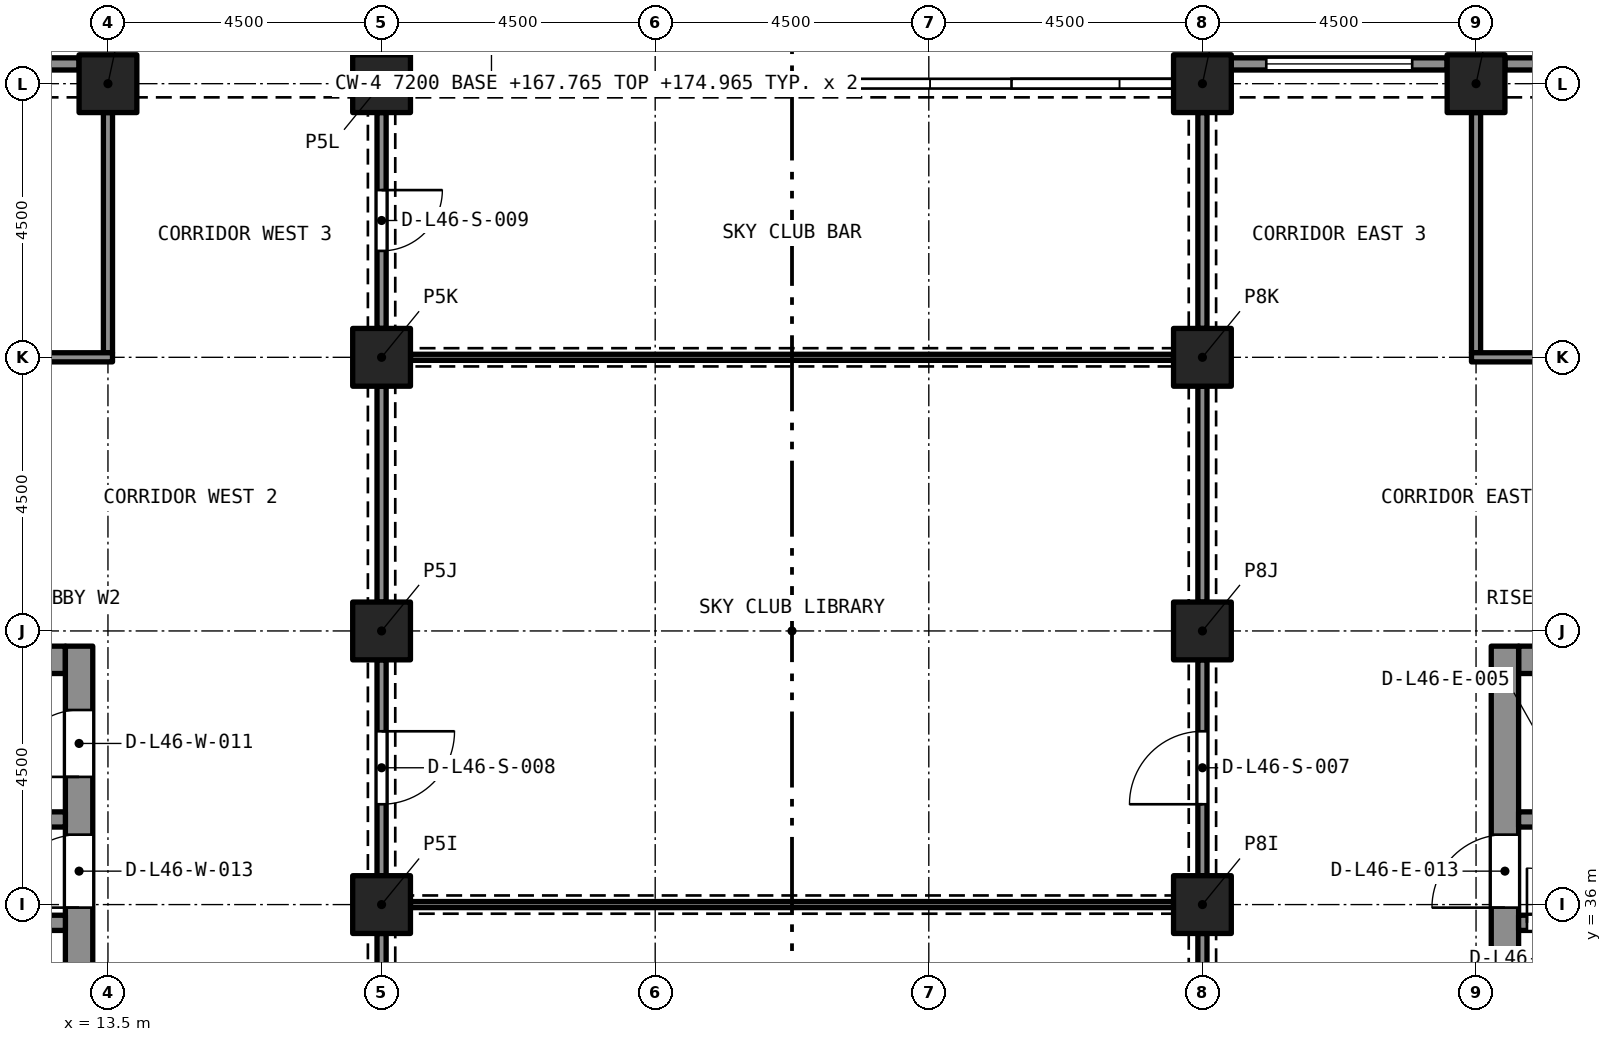
"""IFC4 building model, lengths in metres.
Left out: names, types, materials, properties, quantities, classifications, styles, units other than length and angle.
Written with IfcOpenShell. Run it as: python <this file> out.ifc"""

import sys

from ifc_helpers import new_model, si_unit, direction, frame, frame_2d, origin, origin_2d, place, context, subcontext, project, spatial, rectangle, extrude, element, fill, save


model = new_model("IFC4")
c1 = context("Model", 3, precision=1e-05, world=origin(), true_north=direction((0.0, 1.0)))
c2 = subcontext(c1, "Body", "Model", "MODEL_VIEW")
j1 = project(units=[si_unit("LENGTHUNIT", "METRE"), si_unit("PLANEANGLEUNIT", "RADIAN")], contexts=[c1])
p1 = place(None, origin())
s1 = spatial("IfcSite", under=j1, at=p1, CompositionType="ELEMENT")
p2 = place(p1, origin())
s2 = spatial("IfcBuilding", under=s1, at=p2, CompositionType="ELEMENT")
p3 = place(p2, frame((0.0, 0.0, 168.2)))
s3 = spatial("IfcBuildingStorey", under=s2, at=p3, CompositionType="ELEMENT", Elevation=168.2)
for number, where, z_axis, x_axis in (
    (1, (18.0, 36.0, 0.0), (0.0, 0.0, 1.0), (1.0, 0.0, 0.0)),
    (2, (31.5, 36.0, 0.0), (0.0, 0.0, 1.0), (1.0, 0.0, 0.0)),
    (3, (18.0, 40.5, 0.0), (0.0, 0.0, 1.0), (1.0, 0.0, 0.0)),
    (4, (31.5, 40.5, 0.0), (0.0, 0.0, 1.0), (1.0, 0.0, 0.0)),
    (5, (18.0, 45.0, 0.0), (0.0, 0.0, 1.0), (1.0, 0.0, 0.0)),
    (6, (31.5, 45.0, 0.0), (0.0, 0.0, 1.0), (1.0, 0.0, 0.0)),
    (7, (13.5, 49.5, 0.0), (0.0, 0.0, 1.0), (1.0, 0.0, 0.0)),
    (8, (18.0, 49.5, 0.0), (0.0, 0.0, 1.0), (1.0, 0.0, 0.0)),
    (9, (31.5, 49.5, 0.0), (0.0, 0.0, 1.0), (1.0, 0.0, 0.0)),
    (10, (36.0, 49.5, 0.0), (0.0, 0.0, 1.0), (1.0, 0.0, 0.0)),
):
    element("IfcColumn", number, at=place(p3, frame(where, z_axis=z_axis, x_axis=x_axis)), inside=s3, PredefinedType="COLUMN", context=c2, shape_type="SweptSolid", body=[
        extrude(rectangle(XDim=0.95, YDim=0.95, at=origin_2d()), origin(), (0.0, 0.0, 1.0), 4.4),
    ])
p4 = place(p3, frame((5.2, 40.025, 0.0), z_axis=(0.0, 0.0, 1.0), x_axis=(1.0, 0.0, 0.0)))
e11 = element("IfcWall", 11, at=p4, inside=s3, PredefinedType="SOLIDWALL", context=c2, shape_type="SweptSolid", body=[
    extrude(rectangle(XDim=7.6, YDim=0.45, at=frame_2d((3.8, 0.0))), origin(), (0.0, 0.0, 1.0), 4.4),
])
p5 = place(p3, frame((13.025, 27.25, 0.0), z_axis=(0.0, 0.0, 1.0), x_axis=(0.0, 1.0, 0.0)))
e12 = element("IfcWall", 12, at=p5, inside=s3, PredefinedType="SOLIDWALL", context=c2, shape_type="SweptSolid", body=[
    extrude(rectangle(XDim=13.0, YDim=0.45, at=frame_2d((6.5, 0.0))), origin(), (0.0, 0.0, 1.0), 4.4),
])
p6 = place(p5, frame((10.85, 0.0, 0.0)))
e13 = element("IfcOpeningElement", 13, at=p6, cuts=e12, PredefinedType="OPENING", context=c2, shape_type="SweptSolid", body=[
    extrude(rectangle(XDim=1.1, YDim=2.1, at=frame_2d((0.55, 1.05))), frame((0.0, 0.235, 0.0), z_axis=(0.0, -1.0, 0.0), x_axis=(1.0, 0.0, 0.0)), (0.0, 0.0, 1.0), 0.47),
])
p7 = place(p5, frame((8.7, 0.0, 0.0)))
e14 = element("IfcOpeningElement", 14, at=p7, cuts=e12, PredefinedType="OPENING", context=c2, shape_type="SweptSolid", body=[
    extrude(rectangle(XDim=1.2, YDim=2.1, at=frame_2d((0.6, 1.05))), frame((0.0, 0.235, 0.0), z_axis=(0.0, -1.0, 0.0), x_axis=(1.0, 0.0, 0.0)), (0.0, 0.0, 1.0), 0.47),
])
p8 = place(p3, frame((36.7, 40.025, 0.0), z_axis=(0.0, 0.0, 1.0), x_axis=(1.0, 0.0, 0.0)))
e15 = element("IfcWall", 15, at=p8, inside=s3, PredefinedType="SOLIDWALL", context=c2, shape_type="SweptSolid", body=[
    extrude(rectangle(XDim=7.6, YDim=0.45, at=frame_2d((3.8, 0.0))), origin(), (0.0, 0.0, 1.0), 4.4),
])
p9 = place(p3, frame((36.475, 27.25, 0.0), z_axis=(0.0, 0.0, 1.0), x_axis=(0.0, 1.0, 0.0)))
e16 = element("IfcWall", 16, at=p9, inside=s3, PredefinedType="SOLIDWALL", context=c2, shape_type="SweptSolid", body=[
    extrude(rectangle(XDim=13.0, YDim=0.45, at=frame_2d((6.5, 0.0))), origin(), (0.0, 0.0, 1.0), 4.4),
])
p10 = place(p9, frame((8.7, 0.0, 0.0)))
e17 = element("IfcOpeningElement", 17, at=p10, cuts=e16, PredefinedType="OPENING", context=c2, shape_type="SweptSolid", body=[
    extrude(rectangle(XDim=1.2, YDim=2.1, at=frame_2d((0.6, 1.05))), frame((0.0, 0.235, 0.0), z_axis=(0.0, -1.0, 0.0), x_axis=(1.0, 0.0, 0.0)), (0.0, 0.0, 1.0), 0.47),
])
p11 = place(p3, frame((36.475, 49.825, 0.0), z_axis=(0.0, 0.0, 1.0), x_axis=(1.0, 0.0, 0.0)))
e18 = element("IfcWall", 18, at=p11, inside=s3, PredefinedType="SOLIDWALL", context=c2, shape_type="SweptSolid", body=[
    extrude(rectangle(XDim=3.55, YDim=0.2, at=frame_2d((1.775, 0.0))), origin(), (0.0, 0.0, 1.0), 4.4),
])
p12 = place(p11, frame((0.575, 0.0, 0.45)))
e19 = element("IfcOpeningElement", 19, at=p12, cuts=e18, PredefinedType="OPENING", context=c2, shape_type="SweptSolid", body=[
    extrude(rectangle(XDim=2.4, YDim=2.55, at=frame_2d((1.2, 1.275))), frame((0.0, 0.11, 0.0), z_axis=(0.0, -1.0, 0.0), x_axis=(1.0, 0.0, 0.0)), (0.0, 0.0, 1.0), 0.22),
])
p13 = place(p3, frame((31.975, 49.825, 0.0), z_axis=(0.0, 0.0, 1.0), x_axis=(1.0, 0.0, 0.0)))
e20 = element("IfcWall", 20, at=p13, inside=s3, PredefinedType="SOLIDWALL", context=c2, shape_type="SweptSolid", body=[
    extrude(rectangle(XDim=3.55, YDim=0.2, at=frame_2d((1.775, 0.0))), origin(), (0.0, 0.0, 1.0), 4.4),
])
p14 = place(p13, frame((0.575, 0.0, 0.45)))
e21 = element("IfcOpeningElement", 21, at=p14, cuts=e20, PredefinedType="OPENING", context=c2, shape_type="SweptSolid", body=[
    extrude(rectangle(XDim=2.4, YDim=2.55, at=frame_2d((1.2, 1.275))), frame((0.0, 0.11, 0.0), z_axis=(0.0, -1.0, 0.0), x_axis=(1.0, 0.0, 0.0)), (0.0, 0.0, 1.0), 0.22),
])
p15 = place(p3, frame((9.475, 49.825, 0.0), z_axis=(0.0, 0.0, 1.0), x_axis=(1.0, 0.0, 0.0)))
e22 = element("IfcWall", 22, at=p15, inside=s3, PredefinedType="SOLIDWALL", context=c2, shape_type="SweptSolid", body=[
    extrude(rectangle(XDim=3.55, YDim=0.2, at=frame_2d((1.775, 0.0))), origin(), (0.0, 0.0, 1.0), 4.4),
])
p16 = place(p15, frame((0.575, 0.0, 0.45)))
e23 = element("IfcOpeningElement", 23, at=p16, cuts=e22, PredefinedType="OPENING", context=c2, shape_type="SweptSolid", body=[
    extrude(rectangle(XDim=2.4, YDim=2.55, at=frame_2d((1.2, 1.275))), frame((0.0, 0.11, 0.0), z_axis=(0.0, -1.0, 0.0), x_axis=(1.0, 0.0, 0.0)), (0.0, 0.0, 1.0), 0.22),
])
p17 = place(p3, frame((5.2, 35.7, 0.0), z_axis=(0.0, 0.0, 1.0), x_axis=(1.0, 0.0, 0.0)))
e24 = element("IfcWall", 24, at=p17, inside=s3, PredefinedType="SOLIDWALL", context=c2, shape_type="SweptSolid", body=[
    extrude(rectangle(XDim=7.6, YDim=0.25, at=frame_2d((3.8, 0.0))), origin(), (0.0, 0.0, 1.0), 4.1),
])
p18 = place(p17, frame((0.725, 0.0, 0.0)))
e25 = element("IfcOpeningElement", 25, at=p18, cuts=e24, PredefinedType="OPENING", context=c2, shape_type="SweptSolid", body=[
    extrude(rectangle(XDim=1.1, YDim=2.4, at=frame_2d((0.55, 1.2))), frame((0.0, 0.135, 0.0), z_axis=(0.0, -1.0, 0.0), x_axis=(1.0, 0.0, 0.0)), (0.0, 0.0, 1.0), 0.27),
])
p19 = place(p17, frame((5.875, 0.0, 0.0)))
e26 = element("IfcOpeningElement", 26, at=p19, cuts=e24, PredefinedType="OPENING", context=c2, shape_type="SweptSolid", body=[
    extrude(rectangle(XDim=0.9, YDim=2.1, at=frame_2d((0.45, 1.05))), frame((0.0, 0.135, 0.0), z_axis=(0.0, -1.0, 0.0), x_axis=(1.0, 0.0, 0.0)), (0.0, 0.0, 1.0), 0.27),
])
p20 = place(p3, frame((5.2, 37.4, 0.0), z_axis=(0.0, 0.0, 1.0), x_axis=(1.0, 0.0, 0.0)))
e27 = element("IfcWall", 27, at=p20, inside=s3, PredefinedType="SOLIDWALL", context=c2, shape_type="SweptSolid", body=[
    extrude(rectangle(XDim=7.6, YDim=0.25, at=frame_2d((3.8, 0.0))), origin(), (0.0, 0.0, 1.0), 4.1),
])
p21 = place(p20, frame((0.7, 0.0, 0.0)))
e28 = element("IfcOpeningElement", 28, at=p21, cuts=e27, PredefinedType="OPENING", context=c2, shape_type="SweptSolid", body=[
    extrude(rectangle(XDim=1.1, YDim=2.4, at=frame_2d((0.55, 1.2))), frame((0.0, 0.135, 0.0), z_axis=(0.0, -1.0, 0.0), x_axis=(1.0, 0.0, 0.0)), (0.0, 0.0, 1.0), 0.27),
])
p22 = place(p3, frame((36.7, 35.7, 0.0), z_axis=(0.0, 0.0, 1.0), x_axis=(1.0, 0.0, 0.0)))
e29 = element("IfcWall", 29, at=p22, inside=s3, PredefinedType="SOLIDWALL", context=c2, shape_type="SweptSolid", body=[
    extrude(rectangle(XDim=7.6, YDim=0.25, at=frame_2d((3.8, 0.0))), origin(), (0.0, 0.0, 1.0), 4.1),
])
p23 = place(p22, frame((5.775, 0.0, 0.0)))
e30 = element("IfcOpeningElement", 30, at=p23, cuts=e29, PredefinedType="OPENING", context=c2, shape_type="SweptSolid", body=[
    extrude(rectangle(XDim=1.1, YDim=2.4, at=frame_2d((0.55, 1.2))), frame((0.0, 0.135, 0.0), z_axis=(0.0, -1.0, 0.0), x_axis=(1.0, 0.0, 0.0)), (0.0, 0.0, 1.0), 0.27),
])
p24 = place(p22, frame((1.512, 0.0, 0.0)))
e31 = element("IfcOpeningElement", 31, at=p24, cuts=e29, PredefinedType="OPENING", context=c2, shape_type="SweptSolid", body=[
    extrude(rectangle(XDim=0.9, YDim=2.1, at=frame_2d((0.45, 1.05))), frame((0.0, 0.135, 0.0), z_axis=(0.0, -1.0, 0.0), x_axis=(1.0, 0.0, 0.0)), (0.0, 0.0, 1.0), 0.27),
])
p25 = place(p22, frame((0.137, 0.0, 0.0)))
e32 = element("IfcOpeningElement", 32, at=p25, cuts=e29, PredefinedType="OPENING", context=c2, shape_type="SweptSolid", body=[
    extrude(rectangle(XDim=0.9, YDim=2.1, at=frame_2d((0.45, 1.05))), frame((0.0, 0.135, 0.0), z_axis=(0.0, -1.0, 0.0), x_axis=(1.0, 0.0, 0.0)), (0.0, 0.0, 1.0), 0.27),
])
p26 = place(p3, frame((36.7, 37.4, 0.0), z_axis=(0.0, 0.0, 1.0), x_axis=(1.0, 0.0, 0.0)))
e33 = element("IfcWall", 33, at=p26, inside=s3, PredefinedType="SOLIDWALL", context=c2, shape_type="SweptSolid", body=[
    extrude(rectangle(XDim=7.6, YDim=0.25, at=frame_2d((3.8, 0.0))), origin(), (0.0, 0.0, 1.0), 4.1),
])
p27 = place(p26, frame((0.75, 0.0, 0.0)))
e34 = element("IfcOpeningElement", 34, at=p27, cuts=e33, PredefinedType="OPENING", context=c2, shape_type="SweptSolid", body=[
    extrude(rectangle(XDim=0.7, YDim=2.1, at=frame_2d((0.35, 1.05))), frame((0.0, 0.135, 0.0), z_axis=(0.0, -1.0, 0.0), x_axis=(1.0, 0.0, 0.0)), (0.0, 0.0, 1.0), 0.27),
])
p28 = place(p26, frame((5.9, 0.0, 0.0)))
e35 = element("IfcOpeningElement", 35, at=p28, cuts=e33, PredefinedType="OPENING", context=c2, shape_type="SweptSolid", body=[
    extrude(rectangle(XDim=0.9, YDim=2.1, at=frame_2d((0.45, 1.05))), frame((0.0, 0.135, 0.0), z_axis=(0.0, -1.0, 0.0), x_axis=(1.0, 0.0, 0.0)), (0.0, 0.0, 1.0), 0.27),
])
p29 = place(p26, frame((3.2, 0.0, 0.0)))
e36 = element("IfcOpeningElement", 36, at=p29, cuts=e33, PredefinedType="OPENING", context=c2, shape_type="SweptSolid", body=[
    extrude(rectangle(XDim=0.9, YDim=2.1, at=frame_2d((0.45, 1.05))), frame((0.0, 0.135, 0.0), z_axis=(0.0, -1.0, 0.0), x_axis=(1.0, 0.0, 0.0)), (0.0, 0.0, 1.0), 0.27),
])
p30 = place(p3, frame((18.475, 36.0, 0.0), z_axis=(0.0, 0.0, 1.0), x_axis=(1.0, 0.0, 0.0)))
e37 = element("IfcWall", 37, at=p30, inside=s3, PredefinedType="PARTITIONING", context=c2, shape_type="SweptSolid", body=[
    extrude(rectangle(XDim=12.55, YDim=0.1, at=frame_2d((6.275, 0.0))), origin(), (0.0, 0.0, 1.0), 3.95),
])
p31 = place(p3, frame((31.5, 31.975, 0.0), z_axis=(0.0, 0.0, 1.0), x_axis=(0.0, 1.0, 0.0)))
e38 = element("IfcWall", 38, at=p31, inside=s3, PredefinedType="PARTITIONING", context=c2, shape_type="SweptSolid", body=[
    extrude(rectangle(XDim=3.55, YDim=0.15, at=frame_2d((1.775, 0.0))), origin(), (0.0, 0.0, 1.0), 3.58),
])
p32 = place(p31, frame((1.175, 0.0, 0.0)))
e39 = element("IfcOpeningElement", 39, at=p32, cuts=e38, PredefinedType="OPENING", context=c2, shape_type="SweptSolid", body=[
    extrude(rectangle(XDim=1.2, YDim=2.1, at=frame_2d((0.6, 1.05))), frame((0.0, 0.085, 0.0), z_axis=(0.0, -1.0, 0.0), x_axis=(1.0, 0.0, 0.0)), (0.0, 0.0, 1.0), 0.17),
])
p33 = place(p3, frame((18.0, 31.975, 0.0), z_axis=(0.0, 0.0, 1.0), x_axis=(0.0, 1.0, 0.0)))
e40 = element("IfcWall", 40, at=p33, inside=s3, PredefinedType="PARTITIONING", context=c2, shape_type="SweptSolid", body=[
    extrude(rectangle(XDim=3.55, YDim=0.15, at=frame_2d((1.775, 0.0))), origin(), (0.0, 0.0, 1.0), 3.58),
])
p34 = place(p3, frame((18.475, 45.0, 0.0), z_axis=(0.0, 0.0, 1.0), x_axis=(1.0, 0.0, 0.0)))
e41 = element("IfcWall", 41, at=p34, inside=s3, PredefinedType="PARTITIONING", context=c2, shape_type="SweptSolid", body=[
    extrude(rectangle(XDim=12.55, YDim=0.1, at=frame_2d((6.275, 0.0))), origin(), (0.0, 0.0, 1.0), 3.95),
])
p35 = place(p3, frame((31.5, 36.475, 0.0), z_axis=(0.0, 0.0, 1.0), x_axis=(0.0, 1.0, 0.0)))
e42 = element("IfcWall", 42, at=p35, inside=s3, PredefinedType="PARTITIONING", context=c2, shape_type="SweptSolid", body=[
    extrude(rectangle(XDim=3.55, YDim=0.15, at=frame_2d((1.775, 0.0))), origin(), (0.0, 0.0, 1.0), 3.58),
])
p36 = place(p35, frame((1.175, 0.0, 0.0)))
e43 = element("IfcOpeningElement", 43, at=p36, cuts=e42, PredefinedType="OPENING", context=c2, shape_type="SweptSolid", body=[
    extrude(rectangle(XDim=1.2, YDim=2.1, at=frame_2d((0.6, 1.05))), frame((0.0, 0.085, 0.0), z_axis=(0.0, -1.0, 0.0), x_axis=(1.0, 0.0, 0.0)), (0.0, 0.0, 1.0), 0.17),
])
p37 = place(p3, frame((31.5, 40.975, 0.0), z_axis=(0.0, 0.0, 1.0), x_axis=(0.0, 1.0, 0.0)))
e44 = element("IfcWall", 44, at=p37, inside=s3, PredefinedType="PARTITIONING", context=c2, shape_type="SweptSolid", body=[
    extrude(rectangle(XDim=3.55, YDim=0.15, at=frame_2d((1.775, 0.0))), origin(), (0.0, 0.0, 1.0), 3.58),
])
p38 = place(p3, frame((18.0, 40.025, 0.0), z_axis=(0.0, 0.0, 1.0), x_axis=(0.0, -1.0, 0.0)))
e45 = element("IfcWall", 45, at=p38, inside=s3, PredefinedType="PARTITIONING", context=c2, shape_type="SweptSolid", body=[
    extrude(rectangle(XDim=3.55, YDim=0.15, at=frame_2d((1.775, 0.0))), origin(), (0.0, 0.0, 1.0), 3.58),
])
p39 = place(p38, frame((1.175, 0.0, 0.0)))
e46 = element("IfcOpeningElement", 46, at=p39, cuts=e45, PredefinedType="OPENING", context=c2, shape_type="SweptSolid", body=[
    extrude(rectangle(XDim=1.2, YDim=2.1, at=frame_2d((0.6, 1.05))), frame((0.0, 0.085, 0.0), z_axis=(0.0, -1.0, 0.0), x_axis=(1.0, 0.0, 0.0)), (0.0, 0.0, 1.0), 0.17),
])
for number, where, z_axis, x_axis in (
    (47, (18.0, 40.975, 0.0), (0.0, 0.0, 1.0), (0.0, 1.0, 0.0)),
    (48, (31.5, 45.475, 0.0), (0.0, 0.0, 1.0), (0.0, 1.0, 0.0)),
):
    element("IfcWall", number, at=place(p3, frame(where, z_axis=z_axis, x_axis=x_axis)), inside=s3, PredefinedType="PARTITIONING", context=c2, shape_type="SweptSolid", body=[
        extrude(rectangle(XDim=3.55, YDim=0.15, at=frame_2d((1.775, 0.0))), origin(), (0.0, 0.0, 1.0), 3.58),
    ])
p40 = place(p3, frame((18.0, 49.025, 0.0), z_axis=(0.0, 0.0, 1.0), x_axis=(0.0, -1.0, 0.0)))
e49 = element("IfcWall", 49, at=p40, inside=s3, PredefinedType="PARTITIONING", context=c2, shape_type="SweptSolid", body=[
    extrude(rectangle(XDim=3.55, YDim=0.15, at=frame_2d((1.775, 0.0))), origin(), (0.0, 0.0, 1.0), 3.58),
])
p41 = place(p40, frame((1.275, 0.0, 0.0)))
e50 = element("IfcOpeningElement", 50, at=p41, cuts=e49, PredefinedType="OPENING", context=c2, shape_type="SweptSolid", body=[
    extrude(rectangle(XDim=1.0, YDim=2.1, at=frame_2d((0.5, 1.05))), frame((0.0, 0.085, 0.0), z_axis=(0.0, -1.0, 0.0), x_axis=(1.0, 0.0, 0.0)), (0.0, 0.0, 1.0), 0.17),
])
p42 = place(p3, frame((36.0, 45.075, 0.0), z_axis=(0.0, 0.0, 1.0), x_axis=(0.0, 1.0, 0.0)))
e51 = element("IfcWall", 51, at=p42, inside=s3, PredefinedType="PARTITIONING", context=c2, shape_type="SweptSolid", body=[
    extrude(rectangle(XDim=3.95, YDim=0.15, at=frame_2d((1.975, 0.0))), origin(), (0.0, 0.0, 1.0), 4.1),
])
p43 = place(p3, frame((35.925, 45.0, 0.0), z_axis=(0.0, 0.0, 1.0), x_axis=(1.0, 0.0, 0.0)))
e52 = element("IfcWall", 52, at=p43, inside=s3, PredefinedType="PARTITIONING", context=c2, shape_type="SweptSolid", body=[
    extrude(rectangle(XDim=4.575, YDim=0.15, at=frame_2d((2.288, 0.0))), origin(), (0.0, 0.0, 1.0), 4.1),
])
p44 = place(p43, frame((1.925, 0.0, 0.0)))
e53 = element("IfcOpeningElement", 53, at=p44, cuts=e52, PredefinedType="OPENING", context=c2, shape_type="SweptSolid", body=[
    extrude(rectangle(XDim=0.8, YDim=2.1, at=frame_2d((0.4, 1.05))), frame((0.0, 0.085, 0.0), z_axis=(0.0, -1.0, 0.0), x_axis=(1.0, 0.0, 0.0)), (0.0, 0.0, 1.0), 0.17),
])
p45 = place(p3, frame((13.5, 45.075, 0.0), z_axis=(0.0, 0.0, 1.0), x_axis=(0.0, 1.0, 0.0)))
e54 = element("IfcWall", 54, at=p45, inside=s3, PredefinedType="PARTITIONING", context=c2, shape_type="SweptSolid", body=[
    extrude(rectangle(XDim=3.95, YDim=0.15, at=frame_2d((1.975, 0.0))), origin(), (0.0, 0.0, 1.0), 4.1),
])
p46 = place(p3, frame((9.0, 45.0, 0.0), z_axis=(0.0, 0.0, 1.0), x_axis=(1.0, 0.0, 0.0)))
e55 = element("IfcWall", 55, at=p46, inside=s3, PredefinedType="PARTITIONING", context=c2, shape_type="SweptSolid", body=[
    extrude(rectangle(XDim=4.575, YDim=0.15, at=frame_2d((2.288, 0.0))), origin(), (0.0, 0.0, 1.0), 4.1),
])
p47 = place(p46, frame((1.85, 0.0, 0.0)))
e56 = element("IfcOpeningElement", 56, at=p47, cuts=e55, PredefinedType="OPENING", context=c2, shape_type="SweptSolid", body=[
    extrude(rectangle(XDim=0.8, YDim=2.1, at=frame_2d((0.4, 1.05))), frame((0.0, 0.085, 0.0), z_axis=(0.0, -1.0, 0.0), x_axis=(1.0, 0.0, 0.0)), (0.0, 0.0, 1.0), 0.17),
])
p48 = place(p14, origin())
e57 = element("IfcWindow", 57, at=p48, inside=s3, PartitioningType="SINGLE_PANEL", PredefinedType="WINDOW", context=c2, shape_type="SweptSolid", body=[
    extrude(rectangle(XDim=2.4, YDim=2.55, at=frame_2d((1.2, 1.275))), frame((0.0, 0.03, 0.0), z_axis=(0.0, -1.0, 0.0), x_axis=(1.0, 0.0, 0.0)), (0.0, 0.0, 1.0), 0.06),
])
fill(e21, e57)
p49 = place(p6, origin())
e58 = element("IfcDoor", 58, at=p49, inside=s3, OperationType="SINGLE_SWING_LEFT", PredefinedType="DOOR", context=c2, shape_type="SweptSolid", body=[
    extrude(rectangle(XDim=1.1, YDim=2.1, at=frame_2d((0.55, 1.05))), frame((0.0, 0.025, 0.0), z_axis=(0.0, -1.0, 0.0), x_axis=(1.0, 0.0, 0.0)), (0.0, 0.0, 1.0), 0.05),
])
fill(e13, e58)
p50 = place(p7, origin())
e59 = element("IfcDoor", 59, at=p50, inside=s3, OperationType="SINGLE_SWING_LEFT", PredefinedType="DOOR", context=c2, shape_type="SweptSolid", body=[
    extrude(rectangle(XDim=1.2, YDim=2.1, at=frame_2d((0.6, 1.05))), frame((0.0, 0.025, 0.0), z_axis=(0.0, -1.0, 0.0), x_axis=(1.0, 0.0, 0.0)), (0.0, 0.0, 1.0), 0.05),
])
fill(e14, e59)
p51 = place(p25, origin())
e60 = element("IfcDoor", 60, at=p51, inside=s3, OperationType="SINGLE_SWING_LEFT", PredefinedType="DOOR", context=c2, shape_type="SweptSolid", body=[
    extrude(rectangle(XDim=0.9, YDim=2.1, at=frame_2d((0.45, 1.05))), frame((0.0, 0.025, 0.0), z_axis=(0.0, -1.0, 0.0), x_axis=(1.0, 0.0, 0.0)), (0.0, 0.0, 1.0), 0.05),
])
fill(e32, e60)
p52 = place(p10, origin())
e61 = element("IfcDoor", 61, at=p52, inside=s3, OperationType="SINGLE_SWING_LEFT", PredefinedType="DOOR", context=c2, shape_type="SweptSolid", body=[
    extrude(rectangle(XDim=1.2, YDim=2.1, at=frame_2d((0.6, 1.05))), frame((0.0, 0.025, 0.0), z_axis=(0.0, -1.0, 0.0), x_axis=(1.0, 0.0, 0.0)), (0.0, 0.0, 1.0), 0.05),
])
fill(e17, e61)
p53 = place(p36, origin())
e62 = element("IfcDoor", 62, at=p53, inside=s3, OperationType="SINGLE_SWING_LEFT", PredefinedType="DOOR", context=c2, shape_type="SweptSolid", body=[
    extrude(rectangle(XDim=1.2, YDim=2.1, at=frame_2d((0.6, 1.05))), frame((0.0, 0.025, 0.0), z_axis=(0.0, -1.0, 0.0), x_axis=(1.0, 0.0, 0.0)), (0.0, 0.0, 1.0), 0.05),
])
fill(e43, e62)
p54 = place(p39, origin())
e63 = element("IfcDoor", 63, at=p54, inside=s3, OperationType="SINGLE_SWING_LEFT", PredefinedType="DOOR", context=c2, shape_type="SweptSolid", body=[
    extrude(rectangle(XDim=1.2, YDim=2.1, at=frame_2d((0.6, 1.05))), frame((0.0, 0.025, 0.0), z_axis=(0.0, -1.0, 0.0), x_axis=(1.0, 0.0, 0.0)), (0.0, 0.0, 1.0), 0.05),
])
fill(e46, e63)
p55 = place(p41, origin())
e64 = element("IfcDoor", 64, at=p55, inside=s3, OperationType="SINGLE_SWING_RIGHT", PredefinedType="DOOR", context=c2, shape_type="SweptSolid", body=[
    extrude(rectangle(XDim=1.0, YDim=2.1, at=frame_2d((0.5, 1.05))), frame((0.0, 0.025, 0.0), z_axis=(0.0, -1.0, 0.0), x_axis=(1.0, 0.0, 0.0)), (0.0, 0.0, 1.0), 0.05),
])
fill(e50, e64)
save(model, sys.argv[1])
